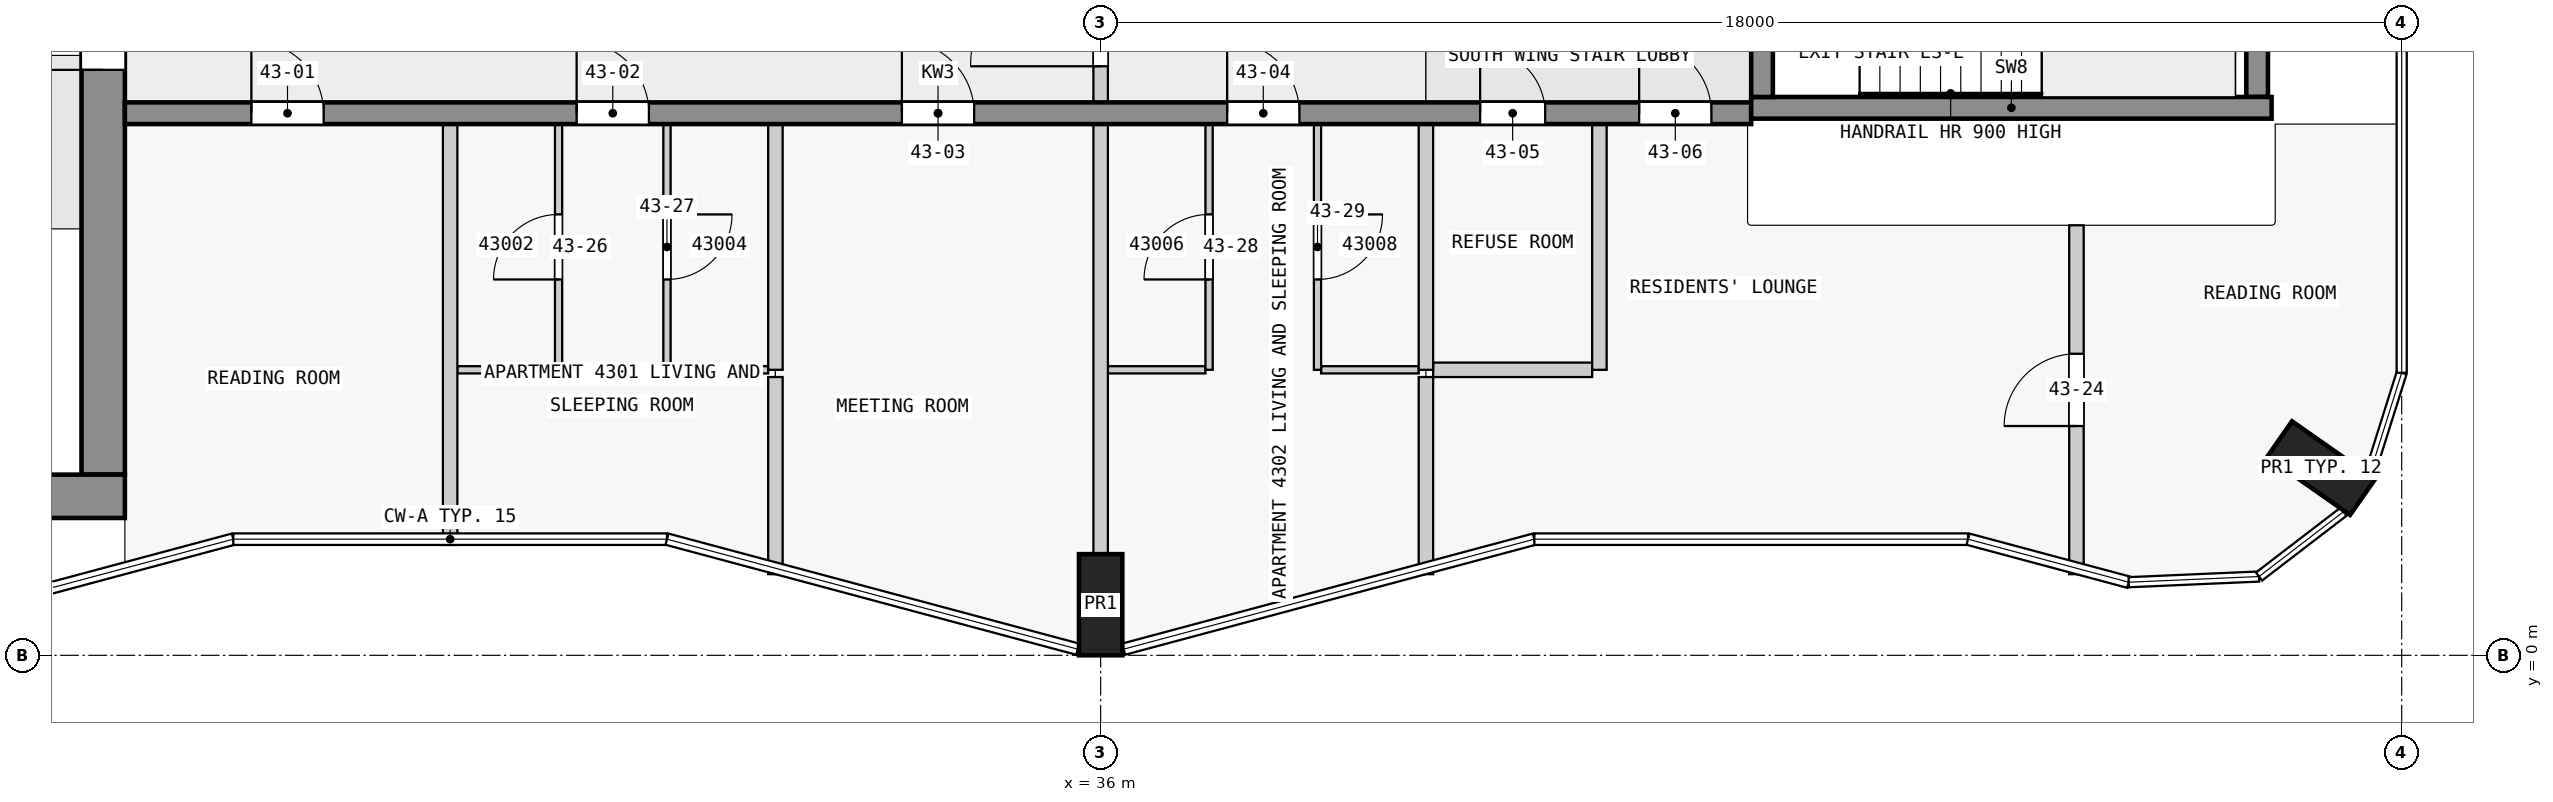
"""IFC4 building model, lengths in metres.
Left out: names, types, materials, properties, quantities, classifications, styles, units other than length and angle.
Written with IfcOpenShell. Run it as: python <this file> out.ifc"""

import sys

from ifc_helpers import new_model, si_unit, direction, frame, frame_2d, origin, origin_2d, place, context, subcontext, project, spatial, rectangle, extrude, element, fill, save


model = new_model("IFC4")
c1 = context("Model", 3, precision=1e-05, world=origin(), true_north=direction((0.0, 1.0)))
c2 = subcontext(c1, "Body", "Model", "MODEL_VIEW")
j1 = project(units=[si_unit("LENGTHUNIT", "METRE"), si_unit("PLANEANGLEUNIT", "RADIAN")], contexts=[c1])
p1 = place(None, origin())
s1 = spatial("IfcSite", under=j1, at=p1, CompositionType="ELEMENT")
p2 = place(p1, origin())
s2 = spatial("IfcBuilding", under=s1, at=p2, CompositionType="ELEMENT")
p3 = place(p2, frame((0.0, 0.0, 167.4)))
s3 = spatial("IfcBuildingStorey", under=s2, at=p3, CompositionType="ELEMENT", Elevation=167.4)
for number, where, z_axis, x_axis in (
    (1, (36.0, 0.7, 0.0), (0.0, 0.0, 1.0), (1.0, 0.0, 0.0)),
    (2, (52.884, 2.59, 0.0), (0.0, 0.0, 1.0), (0.574, 0.819, 0.0)),
):
    element("IfcColumn", number, at=place(p3, frame(where, z_axis=z_axis, x_axis=x_axis)), inside=s3, PredefinedType="COLUMN", context=c2, shape_type="SweptSolid", body=[
        extrude(rectangle(XDim=0.6, YDim=1.4, at=origin_2d()), origin(), (0.0, 0.0, 1.0), 3.5),
    ])
p4 = place(p3, frame((1.7, 2.2, 0.0), z_axis=(0.0, 0.0, 1.0), x_axis=(1.0, 0.0, 0.0)))
e3 = element("IfcWall", 3, at=p4, inside=s3, PredefinedType="SHEAR", context=c2, shape_type="SweptSolid", body=[
    extrude(rectangle(XDim=20.8, YDim=0.6, at=frame_2d((10.4, 0.0))), origin(), (0.0, 0.0, 1.0), 3.25),
])
p5 = place(p3, frame((22.2, 2.5, 0.0), z_axis=(0.0, 0.0, 1.0), x_axis=(0.0, 1.0, 0.0)))
e4 = element("IfcWall", 4, at=p5, inside=s3, PredefinedType="SHEAR", context=c2, shape_type="SweptSolid", body=[
    extrude(rectangle(XDim=14.9, YDim=0.6, at=frame_2d((7.45, 0.0))), origin(), (0.0, 0.0, 1.0), 3.25),
])
p6 = place(p5, frame((5.6, 0.0, 0.0)))
e5 = element("IfcOpeningElement", 5, at=p6, cuts=e4, PredefinedType="OPENING", context=c2, shape_type="SweptSolid", body=[
    extrude(rectangle(XDim=1.8, YDim=2.1, at=frame_2d((0.9, 1.05))), frame((0.0, 0.31, 0.0), z_axis=(0.0, -1.0, 0.0), x_axis=(1.0, 0.0, 0.0)), (0.0, 0.0, 1.0), 0.62),
])
p7 = place(p3, frame((45.15, 7.725, 0.0), z_axis=(0.0, 0.0, 1.0), x_axis=(0.0, 1.0, 0.0)))
e6 = element("IfcWall", 6, at=p7, inside=s3, PredefinedType="SHEAR", context=c2, shape_type="SweptSolid", body=[
    extrude(rectangle(XDim=2.55, YDim=0.3, at=frame_2d((1.275, 0.0))), origin(), (0.0, 0.0, 1.0), 3.5),
])
p8 = place(p7, frame((0.725, 0.0, 0.0)))
e7 = element("IfcOpeningElement", 7, at=p8, cuts=e6, PredefinedType="OPENING", context=c2, shape_type="SweptSolid", body=[
    extrude(rectangle(XDim=1.1, YDim=2.1, at=frame_2d((0.55, 1.05))), frame((0.0, 0.16, 0.0), z_axis=(0.0, -1.0, 0.0), x_axis=(1.0, 0.0, 0.0)), (0.0, 0.0, 1.0), 0.32),
])
p9 = place(p3, frame((52.0, 7.725, 0.0), z_axis=(0.0, 0.0, 1.0), x_axis=(0.0, 1.0, 0.0)))
e8 = element("IfcWall", 8, at=p9, inside=s3, PredefinedType="SHEAR", context=c2, shape_type="SweptSolid", body=[
    extrude(rectangle(XDim=2.55, YDim=0.3, at=frame_2d((1.275, 0.0))), origin(), (0.0, 0.0, 1.0), 3.5),
])
p10 = place(p3, frame((45.0, 7.575, 0.0), z_axis=(0.0, 0.0, 1.0), x_axis=(1.0, 0.0, 0.0)))
e9 = element("IfcWall", 9, at=p10, inside=s3, PredefinedType="SHEAR", context=c2, shape_type="SweptSolid", body=[
    extrude(rectangle(XDim=7.2, YDim=0.3, at=frame_2d((3.6, 0.0))), origin(), (0.0, 0.0, 1.0), 3.5),
])
p11 = place(p3, frame((22.5, 7.5, 0.0), z_axis=(0.0, 0.0, 1.0), x_axis=(1.0, 0.0, 0.0)))
e10 = element("IfcWall", 10, at=p11, inside=s3, PredefinedType="SHEAR", context=c2, shape_type="SweptSolid", body=[
    extrude(rectangle(XDim=22.5, YDim=0.3, at=frame_2d((11.25, 0.0))), origin(), (0.0, 0.0, 1.0), 3.25),
])
p12 = place(p11, frame((1.75, 0.0, 0.0)))
e11 = element("IfcOpeningElement", 11, at=p12, cuts=e10, PredefinedType="OPENING", context=c2, shape_type="SweptSolid", body=[
    extrude(rectangle(XDim=1.0, YDim=2.1, at=frame_2d((0.5, 1.05))), frame((0.0, 0.16, 0.0), z_axis=(0.0, -1.0, 0.0), x_axis=(1.0, 0.0, 0.0)), (0.0, 0.0, 1.0), 0.32),
])
p13 = place(p11, frame((6.25, 0.0, 0.0)))
e12 = element("IfcOpeningElement", 12, at=p13, cuts=e10, PredefinedType="OPENING", context=c2, shape_type="SweptSolid", body=[
    extrude(rectangle(XDim=1.0, YDim=2.1, at=frame_2d((0.5, 1.05))), frame((0.0, 0.16, 0.0), z_axis=(0.0, -1.0, 0.0), x_axis=(1.0, 0.0, 0.0)), (0.0, 0.0, 1.0), 0.32),
])
p14 = place(p11, frame((10.75, 0.0, 0.0)))
e13 = element("IfcOpeningElement", 13, at=p14, cuts=e10, PredefinedType="OPENING", context=c2, shape_type="SweptSolid", body=[
    extrude(rectangle(XDim=1.0, YDim=2.1, at=frame_2d((0.5, 1.05))), frame((0.0, 0.16, 0.0), z_axis=(0.0, -1.0, 0.0), x_axis=(1.0, 0.0, 0.0)), (0.0, 0.0, 1.0), 0.32),
])
p15 = place(p11, frame((15.25, 0.0, 0.0)))
e14 = element("IfcOpeningElement", 14, at=p15, cuts=e10, PredefinedType="OPENING", context=c2, shape_type="SweptSolid", body=[
    extrude(rectangle(XDim=1.0, YDim=2.1, at=frame_2d((0.5, 1.05))), frame((0.0, 0.16, 0.0), z_axis=(0.0, -1.0, 0.0), x_axis=(1.0, 0.0, 0.0)), (0.0, 0.0, 1.0), 0.32),
])
p16 = place(p11, frame((18.75, 0.0, 0.0)))
e15 = element("IfcOpeningElement", 15, at=p16, cuts=e10, PredefinedType="OPENING", context=c2, shape_type="SweptSolid", body=[
    extrude(rectangle(XDim=0.9, YDim=2.1, at=frame_2d((0.45, 1.05))), frame((0.0, 0.16, 0.0), z_axis=(0.0, -1.0, 0.0), x_axis=(1.0, 0.0, 0.0)), (0.0, 0.0, 1.0), 0.32),
])
p17 = place(p11, frame((20.95, 0.0, 0.0)))
e16 = element("IfcOpeningElement", 16, at=p17, cuts=e10, PredefinedType="OPENING", context=c2, shape_type="SweptSolid", body=[
    extrude(rectangle(XDim=1.0, YDim=2.1, at=frame_2d((0.5, 1.05))), frame((0.0, 0.16, 0.0), z_axis=(0.0, -1.0, 0.0), x_axis=(1.0, 0.0, 0.0)), (0.0, 0.0, 1.0), 0.32),
])
for number, where, z_axis, x_axis in (
    (17, (27.1, 3.95, 0.0), (0.0, 0.0, 1.0), (1.0, 0.0, 0.0)),
    (18, (30.05, 3.95, 0.0), (0.0, 0.0, 1.0), (1.0, 0.0, 0.0)),
    (19, (36.1, 3.95, 0.0), (0.0, 0.0, 1.0), (1.0, 0.0, 0.0)),
    (20, (39.05, 3.95, 0.0), (0.0, 0.0, 1.0), (1.0, 0.0, 0.0)),
):
    element("IfcWall", number, at=place(p3, frame(where, z_axis=z_axis, x_axis=x_axis)), inside=s3, PredefinedType="PARTITIONING", context=c2, shape_type="SweptSolid", body=[
        extrude(rectangle(XDim=1.35, YDim=0.1, at=frame_2d((0.675, 0.0))), origin(), (0.0, 0.0, 1.0), 3.25),
    ])
p18 = place(p3, frame((40.6, 3.95, 0.0), z_axis=(0.0, 0.0, 1.0), x_axis=(1.0, 0.0, 0.0)))
e21 = element("IfcWall", 21, at=p18, inside=s3, PredefinedType="PARTITIONING", context=c2, shape_type="SweptSolid", body=[
    extrude(rectangle(XDim=2.2, YDim=0.2, at=frame_2d((1.1, 0.0))), origin(), (0.0, 0.0, 1.0), 3.25),
])
p19 = place(p3, frame((27.0, 1.527, 0.0), z_axis=(0.0, 0.0, 1.0), x_axis=(0.0, 1.0, 0.0)))
e22 = element("IfcWall", 22, at=p19, inside=s3, PredefinedType="PARTITIONING", context=c2, shape_type="SweptSolid", body=[
    extrude(rectangle(XDim=5.823, YDim=0.2, at=frame_2d((2.912, 0.0))), origin(), (0.0, 0.0, 1.0), 3.25),
])
p20 = place(p3, frame((28.5, 3.95, 0.0), z_axis=(0.0, 0.0, 1.0), x_axis=(0.0, 1.0, 0.0)))
e23 = element("IfcWall", 23, at=p20, inside=s3, PredefinedType="PARTITIONING", context=c2, shape_type="SweptSolid", body=[
    extrude(rectangle(XDim=3.4, YDim=0.1, at=frame_2d((1.7, 0.0))), origin(), (0.0, 0.0, 1.0), 3.25),
])
p21 = place(p20, frame((1.25, 0.0, 0.0)))
e24 = element("IfcOpeningElement", 24, at=p21, cuts=e23, PredefinedType="OPENING", context=c2, shape_type="SweptSolid", body=[
    extrude(rectangle(XDim=0.9, YDim=2.1, at=frame_2d((0.45, 1.05))), frame((0.0, 0.06, 0.0), z_axis=(0.0, -1.0, 0.0), x_axis=(1.0, 0.0, 0.0)), (0.0, 0.0, 1.0), 0.12),
])
p22 = place(p3, frame((30.0, 7.35, 0.0), z_axis=(0.0, 0.0, 1.0), x_axis=(0.0, -1.0, 0.0)))
e25 = element("IfcWall", 25, at=p22, inside=s3, PredefinedType="PARTITIONING", context=c2, shape_type="SweptSolid", body=[
    extrude(rectangle(XDim=3.4, YDim=0.1, at=frame_2d((1.7, 0.0))), origin(), (0.0, 0.0, 1.0), 3.25),
])
p23 = place(p22, frame((1.25, 0.0, 0.0)))
e26 = element("IfcOpeningElement", 26, at=p23, cuts=e25, PredefinedType="OPENING", context=c2, shape_type="SweptSolid", body=[
    extrude(rectangle(XDim=0.9, YDim=2.1, at=frame_2d((0.45, 1.05))), frame((0.0, 0.06, 0.0), z_axis=(0.0, -1.0, 0.0), x_axis=(1.0, 0.0, 0.0)), (0.0, 0.0, 1.0), 0.12),
])
p24 = place(p3, frame((31.5, 3.85, 0.0), z_axis=(0.0, 0.0, 1.0), x_axis=(0.0, -1.0, 0.0)))
e27 = element("IfcWall", 27, at=p24, inside=s3, PredefinedType="PARTITIONING", context=c2, shape_type="SweptSolid", body=[
    extrude(rectangle(XDim=2.728, YDim=0.2, at=frame_2d((1.364, 0.0))), origin(), (0.0, 0.0, 1.0), 3.25),
])
p25 = place(p3, frame((31.5, 3.95, 0.0), z_axis=(0.0, 0.0, 1.0), x_axis=(0.0, 1.0, 0.0)))
e28 = element("IfcWall", 28, at=p25, inside=s3, PredefinedType="PARTITIONING", context=c2, shape_type="SweptSolid", body=[
    extrude(rectangle(XDim=3.4, YDim=0.2, at=frame_2d((1.7, 0.0))), origin(), (0.0, 0.0, 1.0), 3.25),
])
p26 = place(p3, frame((36.0, 1.4, 0.0), z_axis=(0.0, 0.0, 1.0), x_axis=(0.0, 1.0, 0.0)))
e29 = element("IfcWall", 29, at=p26, inside=s3, PredefinedType="PARTITIONING", context=c2, shape_type="SweptSolid", body=[
    extrude(rectangle(XDim=5.95, YDim=0.2, at=frame_2d((2.975, 0.0))), origin(), (0.0, 0.0, 1.0), 3.25),
])
p27 = place(p3, frame((37.5, 3.95, 0.0), z_axis=(0.0, 0.0, 1.0), x_axis=(0.0, 1.0, 0.0)))
e30 = element("IfcWall", 30, at=p27, inside=s3, PredefinedType="PARTITIONING", context=c2, shape_type="SweptSolid", body=[
    extrude(rectangle(XDim=3.4, YDim=0.1, at=frame_2d((1.7, 0.0))), origin(), (0.0, 0.0, 1.0), 3.25),
])
p28 = place(p27, frame((1.25, 0.0, 0.0)))
e31 = element("IfcOpeningElement", 31, at=p28, cuts=e30, PredefinedType="OPENING", context=c2, shape_type="SweptSolid", body=[
    extrude(rectangle(XDim=0.9, YDim=2.1, at=frame_2d((0.45, 1.05))), frame((0.0, 0.06, 0.0), z_axis=(0.0, -1.0, 0.0), x_axis=(1.0, 0.0, 0.0)), (0.0, 0.0, 1.0), 0.12),
])
p29 = place(p3, frame((39.0, 7.35, 0.0), z_axis=(0.0, 0.0, 1.0), x_axis=(0.0, -1.0, 0.0)))
e32 = element("IfcWall", 32, at=p29, inside=s3, PredefinedType="PARTITIONING", context=c2, shape_type="SweptSolid", body=[
    extrude(rectangle(XDim=3.4, YDim=0.1, at=frame_2d((1.7, 0.0))), origin(), (0.0, 0.0, 1.0), 3.25),
])
p30 = place(p29, frame((1.25, 0.0, 0.0)))
e33 = element("IfcOpeningElement", 33, at=p30, cuts=e32, PredefinedType="OPENING", context=c2, shape_type="SweptSolid", body=[
    extrude(rectangle(XDim=0.9, YDim=2.1, at=frame_2d((0.45, 1.05))), frame((0.0, 0.06, 0.0), z_axis=(0.0, -1.0, 0.0), x_axis=(1.0, 0.0, 0.0)), (0.0, 0.0, 1.0), 0.12),
])
p31 = place(p3, frame((40.5, 3.85, 0.0), z_axis=(0.0, 0.0, 1.0), x_axis=(0.0, -1.0, 0.0)))
e34 = element("IfcWall", 34, at=p31, inside=s3, PredefinedType="PARTITIONING", context=c2, shape_type="SweptSolid", body=[
    extrude(rectangle(XDim=2.728, YDim=0.2, at=frame_2d((1.364, 0.0))), origin(), (0.0, 0.0, 1.0), 3.25),
])
for number, where, z_axis, x_axis in (
    (35, (40.5, 3.95, 0.0), (0.0, 0.0, 1.0), (0.0, 1.0, 0.0)),
    (36, (42.9, 3.95, 0.0), (0.0, 0.0, 1.0), (0.0, 1.0, 0.0)),
):
    element("IfcWall", number, at=place(p3, frame(where, z_axis=z_axis, x_axis=x_axis)), inside=s3, PredefinedType="PARTITIONING", context=c2, shape_type="SweptSolid", body=[
        extrude(rectangle(XDim=3.4, YDim=0.2, at=frame_2d((1.7, 0.0))), origin(), (0.0, 0.0, 1.0), 3.25),
    ])
p32 = place(p3, frame((49.5, 1.122, 0.0), z_axis=(0.0, 0.0, 1.0), x_axis=(0.0, 1.0, 0.0)))
e37 = element("IfcWall", 37, at=p32, inside=s3, PredefinedType="PARTITIONING", context=c2, shape_type="SweptSolid", body=[
    extrude(rectangle(XDim=4.828, YDim=0.2, at=frame_2d((2.414, 0.0))), origin(), (0.0, 0.0, 1.0), 3.25),
])
p33 = place(p32, frame((2.05, 0.0, 0.0)))
e38 = element("IfcOpeningElement", 38, at=p33, cuts=e37, PredefinedType="OPENING", context=c2, shape_type="SweptSolid", body=[
    extrude(rectangle(XDim=1.0, YDim=2.1, at=frame_2d((0.5, 1.05))), frame((0.0, 0.11, 0.0), z_axis=(0.0, -1.0, 0.0), x_axis=(1.0, 0.0, 0.0)), (0.0, 0.0, 1.0), 0.22),
])
p34 = place(p3, frame((36.0, 7.45, 0.0), z_axis=(0.0, 0.0, 1.0), x_axis=(0.0, 1.0, 0.0)))
e39 = element("IfcWall", 39, at=p34, inside=s3, PredefinedType="PARTITIONING", context=c2, shape_type="SweptSolid", body=[
    extrude(rectangle(XDim=3.1, YDim=0.2, at=frame_2d((1.55, 0.0))), origin(), (0.0, 0.0, 1.0), 3.25),
])
p35 = place(p34, frame((0.7, 0.0, 0.0)))
e40 = element("IfcOpeningElement", 40, at=p35, cuts=e39, PredefinedType="OPENING", context=c2, shape_type="SweptSolid", body=[
    extrude(rectangle(XDim=1.8, YDim=2.1, at=frame_2d((0.9, 1.05))), frame((0.0, 0.11, 0.0), z_axis=(0.0, -1.0, 0.0), x_axis=(1.0, 0.0, 0.0)), (0.0, 0.0, 1.0), 0.22),
])
p36 = place(p6, origin())
e41 = element("IfcDoor", 41, at=p36, inside=s3, OperationType="DOUBLE_DOOR_SINGLE_SWING", PredefinedType="DOOR", context=c2, shape_type="SweptSolid", body=[
    extrude(rectangle(XDim=1.8, YDim=2.1, at=frame_2d((0.9, 1.05))), frame((0.0, 0.025, 0.0), z_axis=(0.0, -1.0, 0.0), x_axis=(1.0, 0.0, 0.0)), (0.0, 0.0, 1.0), 0.05),
])
fill(e5, e41)
p37 = place(p12, origin())
e42 = element("IfcDoor", 42, at=p37, inside=s3, OperationType="SINGLE_SWING_LEFT", PredefinedType="DOOR", context=c2, shape_type="SweptSolid", body=[
    extrude(rectangle(XDim=1.0, YDim=2.1, at=frame_2d((0.5, 1.05))), frame((0.0, 0.025, 0.0), z_axis=(0.0, -1.0, 0.0), x_axis=(1.0, 0.0, 0.0)), (0.0, 0.0, 1.0), 0.05),
])
fill(e11, e42)
p38 = place(p13, origin())
e43 = element("IfcDoor", 43, at=p38, inside=s3, OperationType="SINGLE_SWING_LEFT", PredefinedType="DOOR", context=c2, shape_type="SweptSolid", body=[
    extrude(rectangle(XDim=1.0, YDim=2.1, at=frame_2d((0.5, 1.05))), frame((0.0, 0.025, 0.0), z_axis=(0.0, -1.0, 0.0), x_axis=(1.0, 0.0, 0.0)), (0.0, 0.0, 1.0), 0.05),
])
fill(e12, e43)
p39 = place(p14, origin())
e44 = element("IfcDoor", 44, at=p39, inside=s3, OperationType="SINGLE_SWING_LEFT", PredefinedType="DOOR", context=c2, shape_type="SweptSolid", body=[
    extrude(rectangle(XDim=1.0, YDim=2.1, at=frame_2d((0.5, 1.05))), frame((0.0, 0.025, 0.0), z_axis=(0.0, -1.0, 0.0), x_axis=(1.0, 0.0, 0.0)), (0.0, 0.0, 1.0), 0.05),
])
fill(e13, e44)
p40 = place(p15, origin())
e45 = element("IfcDoor", 45, at=p40, inside=s3, OperationType="SINGLE_SWING_RIGHT", PredefinedType="DOOR", context=c2, shape_type="SweptSolid", body=[
    extrude(rectangle(XDim=1.0, YDim=2.1, at=frame_2d((0.5, 1.05))), frame((0.0, 0.025, 0.0), z_axis=(0.0, -1.0, 0.0), x_axis=(1.0, 0.0, 0.0)), (0.0, 0.0, 1.0), 0.05),
])
fill(e14, e45)
p41 = place(p16, origin())
e46 = element("IfcDoor", 46, at=p41, inside=s3, OperationType="SINGLE_SWING_RIGHT", PredefinedType="DOOR", context=c2, shape_type="SweptSolid", body=[
    extrude(rectangle(XDim=0.9, YDim=2.1, at=frame_2d((0.45, 1.05))), frame((0.0, 0.025, 0.0), z_axis=(0.0, -1.0, 0.0), x_axis=(1.0, 0.0, 0.0)), (0.0, 0.0, 1.0), 0.05),
])
fill(e15, e46)
p42 = place(p17, origin())
e47 = element("IfcDoor", 47, at=p42, inside=s3, OperationType="SINGLE_SWING_RIGHT", PredefinedType="DOOR", context=c2, shape_type="SweptSolid", body=[
    extrude(rectangle(XDim=1.0, YDim=2.1, at=frame_2d((0.5, 1.05))), frame((0.0, 0.025, 0.0), z_axis=(0.0, -1.0, 0.0), x_axis=(1.0, 0.0, 0.0)), (0.0, 0.0, 1.0), 0.05),
])
fill(e16, e47)
p43 = place(p35, origin())
e48 = element("IfcDoor", 48, at=p43, inside=s3, OperationType="SINGLE_SWING_RIGHT", PredefinedType="DOOR", context=c2, shape_type="SweptSolid", body=[
    extrude(rectangle(XDim=1.8, YDim=2.1, at=frame_2d((0.9, 1.05))), frame((0.0, 0.025, 0.0), z_axis=(0.0, -1.0, 0.0), x_axis=(1.0, 0.0, 0.0)), (0.0, 0.0, 1.0), 0.05),
])
fill(e40, e48)
p44 = place(p33, origin())
e49 = element("IfcDoor", 49, at=p44, inside=s3, OperationType="SINGLE_SWING_RIGHT", PredefinedType="DOOR", context=c2, shape_type="SweptSolid", body=[
    extrude(rectangle(XDim=1.0, YDim=2.1, at=frame_2d((0.5, 1.05))), frame((0.0, 0.025, 0.0), z_axis=(0.0, -1.0, 0.0), x_axis=(1.0, 0.0, 0.0)), (0.0, 0.0, 1.0), 0.05),
])
fill(e38, e49)
p45 = place(p21, origin())
e50 = element("IfcDoor", 50, at=p45, inside=s3, OperationType="SINGLE_SWING_RIGHT", PredefinedType="DOOR", context=c2, shape_type="SweptSolid", body=[
    extrude(rectangle(XDim=0.9, YDim=2.1, at=frame_2d((0.45, 1.05))), frame((0.0, 0.025, 0.0), z_axis=(0.0, -1.0, 0.0), x_axis=(1.0, 0.0, 0.0)), (0.0, 0.0, 1.0), 0.05),
])
fill(e24, e50)
p46 = place(p23, origin())
e51 = element("IfcDoor", 51, at=p46, inside=s3, OperationType="SINGLE_SWING_RIGHT", PredefinedType="DOOR", context=c2, shape_type="SweptSolid", body=[
    extrude(rectangle(XDim=0.9, YDim=2.1, at=frame_2d((0.45, 1.05))), frame((0.0, 0.025, 0.0), z_axis=(0.0, -1.0, 0.0), x_axis=(1.0, 0.0, 0.0)), (0.0, 0.0, 1.0), 0.05),
])
fill(e26, e51)
p47 = place(p28, origin())
e52 = element("IfcDoor", 52, at=p47, inside=s3, OperationType="SINGLE_SWING_RIGHT", PredefinedType="DOOR", context=c2, shape_type="SweptSolid", body=[
    extrude(rectangle(XDim=0.9, YDim=2.1, at=frame_2d((0.45, 1.05))), frame((0.0, 0.025, 0.0), z_axis=(0.0, -1.0, 0.0), x_axis=(1.0, 0.0, 0.0)), (0.0, 0.0, 1.0), 0.05),
])
fill(e31, e52)
p48 = place(p30, origin())
e53 = element("IfcDoor", 53, at=p48, inside=s3, OperationType="SINGLE_SWING_RIGHT", PredefinedType="DOOR", context=c2, shape_type="SweptSolid", body=[
    extrude(rectangle(XDim=0.9, YDim=2.1, at=frame_2d((0.45, 1.05))), frame((0.0, 0.025, 0.0), z_axis=(0.0, -1.0, 0.0), x_axis=(1.0, 0.0, 0.0)), (0.0, 0.0, 1.0), 0.05),
])
fill(e33, e53)
save(model, sys.argv[1])
